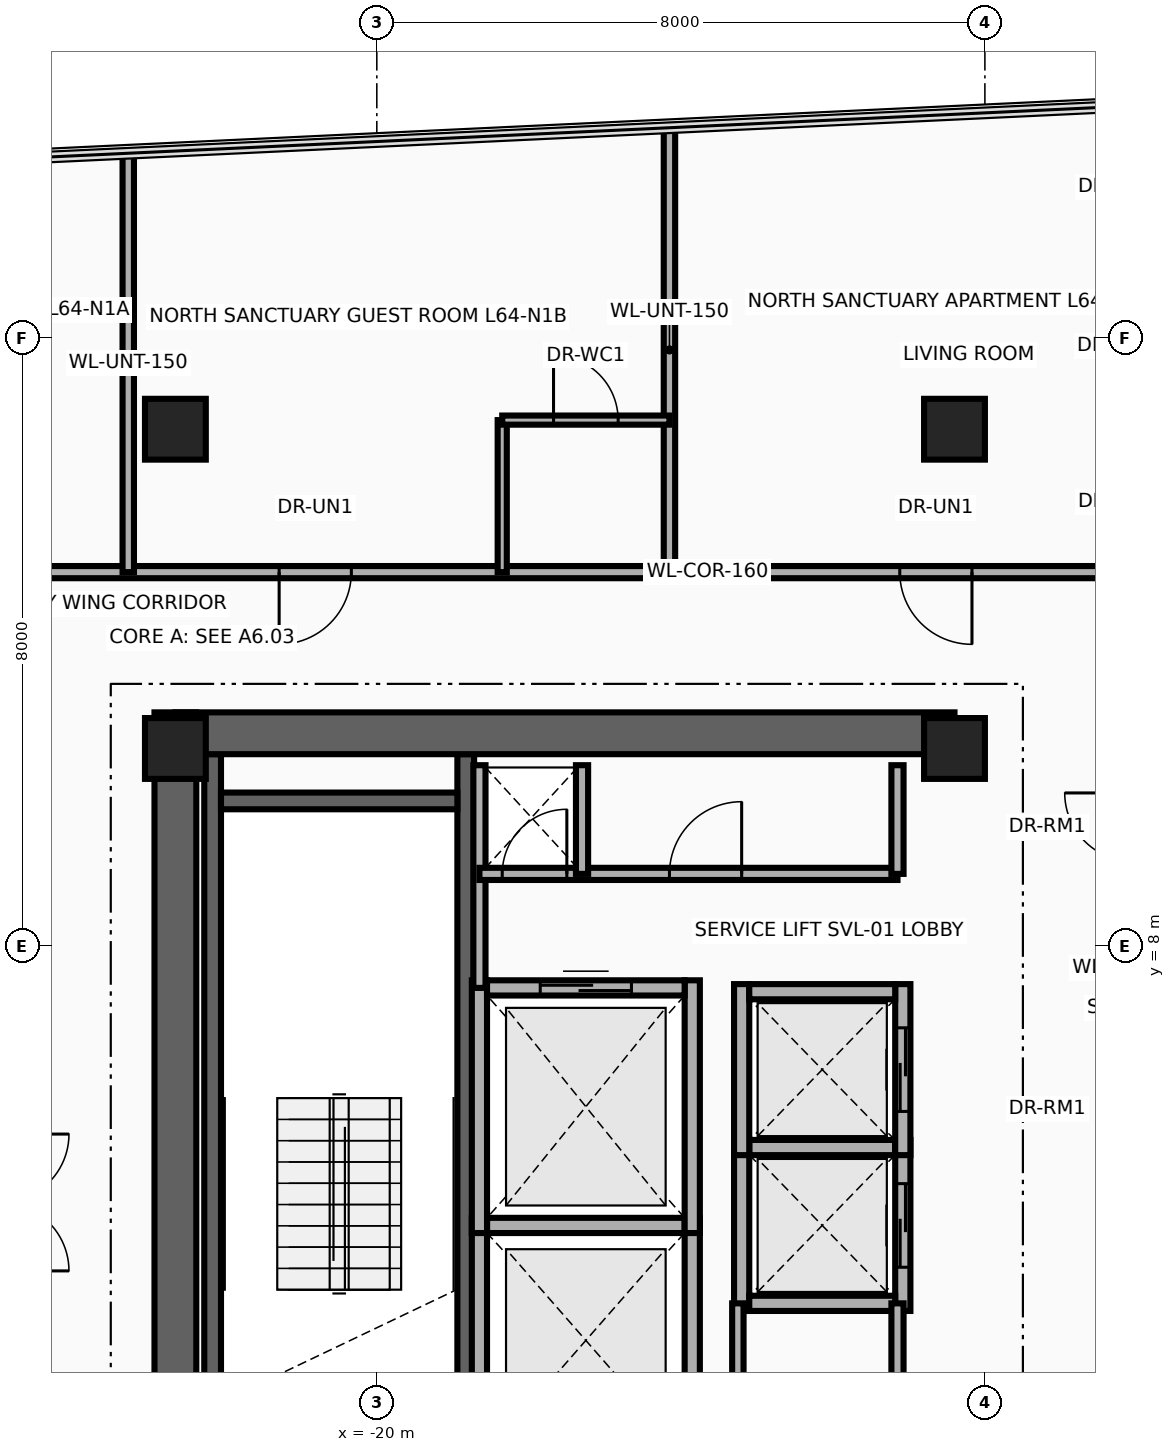
"""IFC4 building model, lengths in metres.
Left out: names, types, materials, properties, quantities, classifications, styles, units other than length and angle.
Written with IfcOpenShell. Run it as: python <this file> out.ifc"""

import sys

from ifc_helpers import new_model, si_unit, direction, frame, frame_2d, origin, origin_2d, place, context, subcontext, project, spatial, rectangle, extrude, source, transform, mapped, element, fill, save


model = new_model("IFC4")
c1 = context("Model", 3, precision=1e-05, world=origin(), true_north=direction((0.0, 1.0)))
c2 = subcontext(c1, "Body", "Model", "MODEL_VIEW")
j1 = project(units=[si_unit("LENGTHUNIT", "METRE"), si_unit("PLANEANGLEUNIT", "RADIAN")], contexts=[c1])
p1 = place(None, origin())
s1 = spatial("IfcSite", under=j1, at=p1, CompositionType="ELEMENT")
p2 = place(p1, origin())
s2 = spatial("IfcBuilding", under=s1, at=p2, CompositionType="ELEMENT")
p3 = place(p2, frame((0.0, 0.0, 247.5)))
s3 = spatial("IfcBuildingStorey", under=s2, at=p3, CompositionType="ELEMENT", Elevation=247.5)
for number, where, z_axis, x_axis in (
    (1, (-22.16, 1.78, 0.0), (0.0, 0.0, 1.0), (0.0, 1.0, 0.0)),
    (2, (-18.83, 1.78, 0.0), (0.0, 0.0, 1.0), (0.0, 1.0, 0.0)),
):
    element("IfcWall", number, at=place(p3, frame(where, z_axis=z_axis, x_axis=x_axis)), inside=s3, PredefinedType="SHEAR", context=c2, shape_type="SweptSolid", body=[
        extrude(rectangle(XDim=8.745, YDim=0.22, at=frame_2d((4.373, 0.0))), origin(), (0.0, 0.0, 1.0), 3.26),
    ])
p4 = place(p3, frame((-22.05, 9.91, 0.0), z_axis=(0.0, 0.0, 1.0), x_axis=(1.0, 0.0, 0.0)))
e3 = element("IfcWall", 3, at=p4, inside=s3, PredefinedType="SHEAR", context=c2, shape_type="SweptSolid", body=[
    extrude(rectangle(XDim=3.11, YDim=0.22, at=frame_2d((1.555, 0.0))), origin(), (0.0, 0.0, 1.0), 3.26),
])
p5 = place(p3, frame((-22.65, -11.075, 0.0), z_axis=(0.0, 0.0, 1.0), x_axis=(0.0, 1.0, 0.0)))
e4 = element("IfcWall", 4, at=p5, inside=s3, PredefinedType="SHEAR", context=c2, shape_type="SweptSolid", body=[
    extrude(rectangle(XDim=22.15, YDim=0.55, at=frame_2d((11.075, 0.0))), origin(), (0.0, 0.0, 1.0), 3.26),
])
p6 = place(p3, frame((-22.65, 10.8, 0.0), z_axis=(0.0, 0.0, 1.0), x_axis=(1.0, 0.0, 0.0)))
e5 = element("IfcWall", 5, at=p6, inside=s3, PredefinedType="SHEAR", context=c2, shape_type="SweptSolid", body=[
    extrude(rectangle(XDim=10.25, YDim=0.55, at=frame_2d((5.125, 0.0))), origin(), (0.0, 0.0, 1.0), 3.26),
])
m1 = source(origin(), c2, "Body", "SweptSolid", [
    extrude(rectangle(XDim=0.8, YDim=0.8, at=origin_2d()), origin(), (0.0, 0.0, 1.0), 3.5),
])
for number, where, z_axis, x_axis in (
    (6, (-22.65, 10.6, 0.0), (0.0, 0.0, 1.0), (1.0, 0.0, 0.0)),
    (7, (-12.4, 10.6, 0.0), (0.0, 0.0, 1.0), (1.0, 0.0, 0.0)),
    (8, (-22.65, 14.8, 0.0), (0.0, 0.0, 1.0), (1.0, 0.0, 0.0)),
    (9, (-12.4, 14.8, 0.0), (0.0, 0.0, 1.0), (1.0, 0.0, 0.0)),
):
    element("IfcColumn", number, at=place(p3, frame(where, z_axis=z_axis, x_axis=x_axis)), inside=s3, PredefinedType="COLUMN", context=c2, shape_type="MappedRepresentation", body=[
        mapped(m1, transform((0.0, 0.0, 0.0), x_axis=(1.0, 0.0, 0.0), y_axis=(0.0, 1.0, 0.0), z_axis=(0.0, 0.0, 1.0), scale=1.0)),
    ])
for number, where, z_axis, x_axis in (
    (10, (-18.65, 1.2, 0.0), (0.0, 0.0, 1.0), (0.0, 1.0, 0.0)),
    (11, (-15.85, 1.2, 0.0), (0.0, 0.0, 1.0), (0.0, 1.0, 0.0)),
):
    element("IfcWall", number, at=place(p3, frame(where, z_axis=z_axis, x_axis=x_axis)), inside=s3, PredefinedType="MOVABLE", context=c2, shape_type="SweptSolid", body=[
        extrude(rectangle(XDim=3.225, YDim=0.2, at=frame_2d((1.613, 0.0))), origin(), (0.0, 0.0, 1.0), 3.26),
    ])
p7 = place(p3, frame((-18.55, 4.325, 0.0), z_axis=(0.0, 0.0, 1.0), x_axis=(1.0, 0.0, 0.0)))
e12 = element("IfcWall", 12, at=p7, inside=s3, PredefinedType="MOVABLE", context=c2, shape_type="SweptSolid", body=[
    extrude(rectangle(XDim=2.6, YDim=0.2, at=frame_2d((1.3, 0.0))), origin(), (0.0, 0.0, 1.0), 3.26),
])
for number, where, z_axis, x_axis in (
    (13, (-18.65, 4.225, 0.0), (0.0, 0.0, 1.0), (0.0, 1.0, 0.0)),
    (14, (-15.85, 4.225, 0.0), (0.0, 0.0, 1.0), (0.0, 1.0, 0.0)),
):
    element("IfcWall", number, at=place(p3, frame(where, z_axis=z_axis, x_axis=x_axis)), inside=s3, PredefinedType="MOVABLE", context=c2, shape_type="SweptSolid", body=[
        extrude(rectangle(XDim=3.325, YDim=0.2, at=frame_2d((1.663, 0.0))), origin(), (0.0, 0.0, 1.0), 3.26),
    ])
p8 = place(p3, frame((-18.55, 7.45, 0.0), z_axis=(0.0, 0.0, 1.0), x_axis=(1.0, 0.0, 0.0)))
e15 = element("IfcWall", 15, at=p8, inside=s3, PredefinedType="MOVABLE", context=c2, shape_type="SweptSolid", body=[
    extrude(rectangle(XDim=2.6, YDim=0.2, at=frame_2d((1.3, 0.0))), origin(), (0.0, 0.0, 1.0), 3.26),
])
p9 = place(p8, frame((0.7, 0.0, 0.0)))
e16 = element("IfcOpeningElement", 16, at=p9, cuts=e15, PredefinedType="OPENING", context=c2, shape_type="SweptSolid", body=[
    extrude(rectangle(XDim=1.2, YDim=2.1, at=frame_2d((0.6, 1.05))), frame((0.0, 0.115, 0.0), z_axis=(0.0, -1.0, 0.0), x_axis=(1.0, 0.0, 0.0)), (0.0, 0.0, 1.0), 0.23),
])
p10 = place(p3, frame((-15.2, 3.2, 0.0), z_axis=(0.0, 0.0, 1.0), x_axis=(0.0, 1.0, 0.0)))
e17 = element("IfcWall", 17, at=p10, inside=s3, PredefinedType="MOVABLE", context=c2, shape_type="SweptSolid", body=[
    extrude(rectangle(XDim=2.25, YDim=0.2, at=frame_2d((1.125, 0.0))), origin(), (0.0, 0.0, 1.0), 3.26),
])
p11 = place(p3, frame((-13.08, 3.2, 0.0), z_axis=(0.0, 0.0, 1.0), x_axis=(0.0, 1.0, 0.0)))
e18 = element("IfcWall", 18, at=p11, inside=s3, PredefinedType="MOVABLE", context=c2, shape_type="SweptSolid", body=[
    extrude(rectangle(XDim=2.25, YDim=0.2, at=frame_2d((1.125, 0.0))), origin(), (0.0, 0.0, 1.0), 3.26),
])
p12 = place(p11, frame((0.575, 0.0, 0.0)))
e19 = element("IfcOpeningElement", 19, at=p12, cuts=e18, PredefinedType="OPENING", context=c2, shape_type="SweptSolid", body=[
    extrude(rectangle(XDim=1.1, YDim=2.1, at=frame_2d((0.55, 1.05))), frame((0.0, 0.115, 0.0), z_axis=(0.0, -1.0, 0.0), x_axis=(1.0, 0.0, 0.0)), (0.0, 0.0, 1.0), 0.23),
])
for number, where, z_axis, x_axis in (
    (20, (-15.1, 3.3, 0.0), (0.0, 0.0, 1.0), (1.0, 0.0, 0.0)),
    (21, (-15.1, 5.35, 0.0), (0.0, 0.0, 1.0), (1.0, 0.0, 0.0)),
):
    element("IfcWall", number, at=place(p3, frame(where, z_axis=z_axis, x_axis=x_axis)), inside=s3, PredefinedType="MOVABLE", context=c2, shape_type="SweptSolid", body=[
        extrude(rectangle(XDim=1.92, YDim=0.2, at=frame_2d((0.96, 0.0))), origin(), (0.0, 0.0, 1.0), 3.26),
    ])
p13 = place(p3, frame((-15.2, 5.25, 0.0), z_axis=(0.0, 0.0, 1.0), x_axis=(0.0, 1.0, 0.0)))
e22 = element("IfcWall", 22, at=p13, inside=s3, PredefinedType="MOVABLE", context=c2, shape_type="SweptSolid", body=[
    extrude(rectangle(XDim=2.25, YDim=0.2, at=frame_2d((1.125, 0.0))), origin(), (0.0, 0.0, 1.0), 3.26),
])
p14 = place(p3, frame((-13.08, 5.25, 0.0), z_axis=(0.0, 0.0, 1.0), x_axis=(0.0, 1.0, 0.0)))
e23 = element("IfcWall", 23, at=p14, inside=s3, PredefinedType="MOVABLE", context=c2, shape_type="SweptSolid", body=[
    extrude(rectangle(XDim=2.25, YDim=0.2, at=frame_2d((1.125, 0.0))), origin(), (0.0, 0.0, 1.0), 3.26),
])
p15 = place(p14, frame((0.575, 0.0, 0.0)))
e24 = element("IfcOpeningElement", 24, at=p15, cuts=e23, PredefinedType="OPENING", context=c2, shape_type="SweptSolid", body=[
    extrude(rectangle(XDim=1.1, YDim=2.1, at=frame_2d((0.55, 1.05))), frame((0.0, 0.115, 0.0), z_axis=(0.0, -1.0, 0.0), x_axis=(1.0, 0.0, 0.0)), (0.0, 0.0, 1.0), 0.23),
])
p16 = place(p3, frame((-15.1, 7.4, 0.0), z_axis=(0.0, 0.0, 1.0), x_axis=(1.0, 0.0, 0.0)))
e25 = element("IfcWall", 25, at=p16, inside=s3, PredefinedType="MOVABLE", context=c2, shape_type="SweptSolid", body=[
    extrude(rectangle(XDim=1.92, YDim=0.2, at=frame_2d((0.96, 0.0))), origin(), (0.0, 0.0, 1.0), 3.26),
])
p17 = place(p3, frame((-18.65, 7.45, 0.0), z_axis=(0.0, 0.0, 1.0), x_axis=(0.0, 1.0, 0.0)))
e26 = element("IfcWall", 26, at=p17, inside=s3, PredefinedType="PARTITIONING", context=c2, shape_type="SweptSolid", body=[
    extrude(rectangle(XDim=2.93, YDim=0.16, at=frame_2d((1.465, 0.0))), origin(), (0.0, 0.0, 1.0), 3.26),
])
p18 = place(p3, frame((-18.65, 8.95, 0.0), z_axis=(0.0, 0.0, 1.0), x_axis=(1.0, 0.0, 0.0)))
e27 = element("IfcWall", 27, at=p18, inside=s3, PredefinedType="PARTITIONING", context=c2, shape_type="SweptSolid", body=[
    extrude(rectangle(XDim=5.5, YDim=0.16, at=frame_2d((2.75, 0.0))), origin(), (0.0, 0.0, 1.0), 3.26),
])
p19 = place(p18, frame((0.3, 0.0, 0.0)))
e28 = element("IfcOpeningElement", 28, at=p19, cuts=e27, PredefinedType="OPENING", context=c2, shape_type="SweptSolid", body=[
    extrude(rectangle(XDim=0.85, YDim=2.05, at=frame_2d((0.425, 1.025))), frame((0.0, 0.095, 0.0), z_axis=(0.0, -1.0, 0.0), x_axis=(1.0, 0.0, 0.0)), (0.0, 0.0, 1.0), 0.19),
])
p20 = place(p18, frame((2.5, 0.0, 0.0)))
e29 = element("IfcOpeningElement", 29, at=p20, cuts=e27, PredefinedType="OPENING", context=c2, shape_type="SweptSolid", body=[
    extrude(rectangle(XDim=0.95, YDim=2.15, at=frame_2d((0.475, 1.075))), frame((0.0, 0.095, 0.0), z_axis=(0.0, -1.0, 0.0), x_axis=(1.0, 0.0, 0.0)), (0.0, 0.0, 1.0), 0.19),
])
for number, where, z_axis, x_axis in (
    (30, (-13.15, 8.95, 0.0), (0.0, 0.0, 1.0), (0.0, 1.0, 0.0)),
    (31, (-17.3, 8.95, 0.0), (0.0, 0.0, 1.0), (0.0, 1.0, 0.0)),
):
    element("IfcWall", number, at=place(p3, frame(where, z_axis=z_axis, x_axis=x_axis)), inside=s3, PredefinedType="PARTITIONING", context=c2, shape_type="SweptSolid", body=[
        extrude(rectangle(XDim=1.43, YDim=0.16, at=frame_2d((0.715, 0.0))), origin(), (0.0, 0.0, 1.0), 3.26),
    ])
p21 = place(p3, frame((-13.15, 1.35, 0.0), z_axis=(0.0, 0.0, 1.0), x_axis=(0.0, 1.0, 0.0)))
e32 = element("IfcWall", 32, at=p21, inside=s3, PredefinedType="PARTITIONING", context=c2, shape_type="SweptSolid", body=[
    extrude(rectangle(XDim=1.95, YDim=0.16, at=frame_2d((0.975, 0.0))), origin(), (0.0, 0.0, 1.0), 3.26),
])
p22 = place(p3, frame((-15.25, 1.35, 0.0), z_axis=(0.0, 0.0, 1.0), x_axis=(0.0, 1.0, 0.0)))
e33 = element("IfcWall", 33, at=p22, inside=s3, PredefinedType="PARTITIONING", context=c2, shape_type="SweptSolid", body=[
    extrude(rectangle(XDim=1.95, YDim=0.15, at=frame_2d((0.975, 0.0))), origin(), (0.0, 0.0, 1.0), 3.26),
])
p23 = place(p3, frame((-30.39, 12.92, 0.0), z_axis=(0.0, 0.0, 1.0), x_axis=(1.0, 0.0, 0.0)))
e34 = element("IfcWall", 34, at=p23, inside=s3, PredefinedType="PARTITIONING", context=c2, shape_type="SweptSolid", body=[
    extrude(rectangle(XDim=29.48, YDim=0.16, at=frame_2d((14.74, 0.0))), origin(), (0.0, 0.0, 1.0), 2.634),
])
p24 = place(p23, frame((3.085, 0.0, 0.0)))
e35 = element("IfcOpeningElement", 35, at=p24, cuts=e34, PredefinedType="OPENING", context=c2, shape_type="SweptSolid", body=[
    extrude(rectangle(XDim=0.95, YDim=2.15, at=frame_2d((0.475, 1.075))), frame((0.0, 0.095, 0.0), z_axis=(0.0, -1.0, 0.0), x_axis=(1.0, 0.0, 0.0)), (0.0, 0.0, 1.0), 0.19),
])
p25 = place(p23, frame((9.105, 0.0, 0.0)))
e36 = element("IfcOpeningElement", 36, at=p25, cuts=e34, PredefinedType="OPENING", context=c2, shape_type="SweptSolid", body=[
    extrude(rectangle(XDim=0.95, YDim=2.15, at=frame_2d((0.475, 1.075))), frame((0.0, 0.095, 0.0), z_axis=(0.0, -1.0, 0.0), x_axis=(1.0, 0.0, 0.0)), (0.0, 0.0, 1.0), 0.19),
])
p26 = place(p23, frame((17.27, 0.0, 0.0)))
e37 = element("IfcOpeningElement", 37, at=p26, cuts=e34, PredefinedType="OPENING", context=c2, shape_type="SweptSolid", body=[
    extrude(rectangle(XDim=0.95, YDim=2.15, at=frame_2d((0.475, 1.075))), frame((0.0, 0.095, 0.0), z_axis=(0.0, -1.0, 0.0), x_axis=(1.0, 0.0, 0.0)), (0.0, 0.0, 1.0), 0.19),
])
p27 = place(p3, frame((-16.15, 12.92, 0.0), z_axis=(0.0, 0.0, 1.0), x_axis=(0.0, 1.0, 0.0)))
e38 = element("IfcWall", 38, at=p27, inside=s3, PredefinedType="PARTITIONING", context=c2, shape_type="SweptSolid", body=[
    extrude(rectangle(XDim=5.846, YDim=0.15, at=frame_2d((2.923, 0.0))), origin(), (0.0, 0.0, 1.0), 2.544),
])
p28 = place(p3, frame((-23.27, 12.92, 0.0), z_axis=(0.0, 0.0, 1.0), x_axis=(0.0, 1.0, 0.0)))
e39 = element("IfcWall", 39, at=p28, inside=s3, PredefinedType="PARTITIONING", context=c2, shape_type="SweptSolid", body=[
    extrude(rectangle(XDim=5.511, YDim=0.15, at=frame_2d((2.755, 0.0))), origin(), (0.0, 0.0, 1.0), 2.544),
])
p29 = place(p3, frame((-18.35, 12.92, 0.0), z_axis=(0.0, 0.0, 1.0), x_axis=(0.0, 1.0, 0.0)))
e40 = element("IfcWall", 40, at=p29, inside=s3, PredefinedType="PARTITIONING", context=c2, shape_type="SweptSolid", body=[
    extrude(rectangle(XDim=2.0, YDim=0.12, at=frame_2d((1.0, 0.0))), origin(), (0.0, 0.0, 1.0), 2.544),
])
p30 = place(p3, frame((-18.35, 14.92, 0.0), z_axis=(0.0, 0.0, 1.0), x_axis=(1.0, 0.0, 0.0)))
e41 = element("IfcWall", 41, at=p30, inside=s3, PredefinedType="PARTITIONING", context=c2, shape_type="SweptSolid", body=[
    extrude(rectangle(XDim=2.2, YDim=0.12, at=frame_2d((1.1, 0.0))), origin(), (0.0, 0.0, 1.0), 2.544),
])
p31 = place(p30, frame((0.675, 0.0, 0.0)))
e42 = element("IfcOpeningElement", 42, at=p31, cuts=e41, PredefinedType="OPENING", context=c2, shape_type="SweptSolid", body=[
    extrude(rectangle(XDim=0.85, YDim=2.1, at=frame_2d((0.425, 1.05))), frame((0.0, 0.075, 0.0), z_axis=(0.0, -1.0, 0.0), x_axis=(1.0, 0.0, 0.0)), (0.0, 0.0, 1.0), 0.15),
])
p32 = place(p9, origin())
e43 = element("IfcDoor", 43, at=p32, inside=s3, OperationType="DOUBLE_DOOR_SLIDING", PredefinedType="DOOR", context=c2, shape_type="SweptSolid", body=[
    extrude(rectangle(XDim=1.2, YDim=2.1, at=frame_2d((0.6, 1.05))), frame((0.0, 0.025, 0.0), z_axis=(0.0, -1.0, 0.0), x_axis=(1.0, 0.0, 0.0)), (0.0, 0.0, 1.0), 0.05),
])
fill(e16, e43)
p33 = place(p12, origin())
e44 = element("IfcDoor", 44, at=p33, inside=s3, OperationType="DOUBLE_DOOR_SLIDING", PredefinedType="DOOR", context=c2, shape_type="SweptSolid", body=[
    extrude(rectangle(XDim=1.1, YDim=2.1, at=frame_2d((0.55, 1.05))), frame((0.0, 0.025, 0.0), z_axis=(0.0, -1.0, 0.0), x_axis=(1.0, 0.0, 0.0)), (0.0, 0.0, 1.0), 0.05),
])
fill(e19, e44)
p34 = place(p15, origin())
e45 = element("IfcDoor", 45, at=p34, inside=s3, OperationType="DOUBLE_DOOR_SLIDING", PredefinedType="DOOR", context=c2, shape_type="SweptSolid", body=[
    extrude(rectangle(XDim=1.1, YDim=2.1, at=frame_2d((0.55, 1.05))), frame((0.0, 0.025, 0.0), z_axis=(0.0, -1.0, 0.0), x_axis=(1.0, 0.0, 0.0)), (0.0, 0.0, 1.0), 0.05),
])
fill(e24, e45)
p35 = place(p19, origin())
e46 = element("IfcDoor", 46, at=p35, inside=s3, OperationType="SINGLE_SWING_LEFT", PredefinedType="DOOR", context=c2, shape_type="SweptSolid", body=[
    extrude(rectangle(XDim=0.85, YDim=2.05, at=frame_2d((0.425, 1.025))), frame((0.0, 0.025, 0.0), z_axis=(0.0, -1.0, 0.0), x_axis=(1.0, 0.0, 0.0)), (0.0, 0.0, 1.0), 0.05),
])
fill(e28, e46)
p36 = place(p20, origin())
e47 = element("IfcDoor", 47, at=p36, inside=s3, OperationType="SINGLE_SWING_RIGHT", PredefinedType="DOOR", context=c2, shape_type="SweptSolid", body=[
    extrude(rectangle(XDim=0.95, YDim=2.15, at=frame_2d((0.475, 1.075))), frame((0.0, 0.025, 0.0), z_axis=(0.0, -1.0, 0.0), x_axis=(1.0, 0.0, 0.0)), (0.0, 0.0, 1.0), 0.05),
])
fill(e29, e47)
p37 = place(p25, frame((0.95, 0.0, 0.0), z_axis=(0.0, 0.0, 1.0), x_axis=(-1.0, 0.0, 0.0)))
e48 = element("IfcDoor", 48, at=p37, inside=s3, OperationType="SINGLE_SWING_LEFT", PredefinedType="DOOR", context=c2, shape_type="SweptSolid", body=[
    extrude(rectangle(XDim=0.95, YDim=2.15, at=frame_2d((0.475, 1.075))), frame((0.0, 0.025, 0.0), z_axis=(0.0, -1.0, 0.0), x_axis=(1.0, 0.0, 0.0)), (0.0, 0.0, 1.0), 0.05),
])
fill(e36, e48)
p38 = place(p31, origin())
e49 = element("IfcDoor", 49, at=p38, inside=s3, OperationType="SINGLE_SWING_RIGHT", PredefinedType="DOOR", context=c2, shape_type="SweptSolid", body=[
    extrude(rectangle(XDim=0.85, YDim=2.1, at=frame_2d((0.425, 1.05))), frame((0.0, 0.025, 0.0), z_axis=(0.0, -1.0, 0.0), x_axis=(1.0, 0.0, 0.0)), (0.0, 0.0, 1.0), 0.05),
])
fill(e42, e49)
p39 = place(p26, frame((0.95, 0.0, 0.0), z_axis=(0.0, 0.0, 1.0), x_axis=(-1.0, 0.0, 0.0)))
e50 = element("IfcDoor", 50, at=p39, inside=s3, OperationType="SINGLE_SWING_LEFT", PredefinedType="DOOR", context=c2, shape_type="SweptSolid", body=[
    extrude(rectangle(XDim=0.95, YDim=2.15, at=frame_2d((0.475, 1.075))), frame((0.0, 0.025, 0.0), z_axis=(0.0, -1.0, 0.0), x_axis=(1.0, 0.0, 0.0)), (0.0, 0.0, 1.0), 0.05),
])
fill(e37, e50)
save(model, sys.argv[1])
